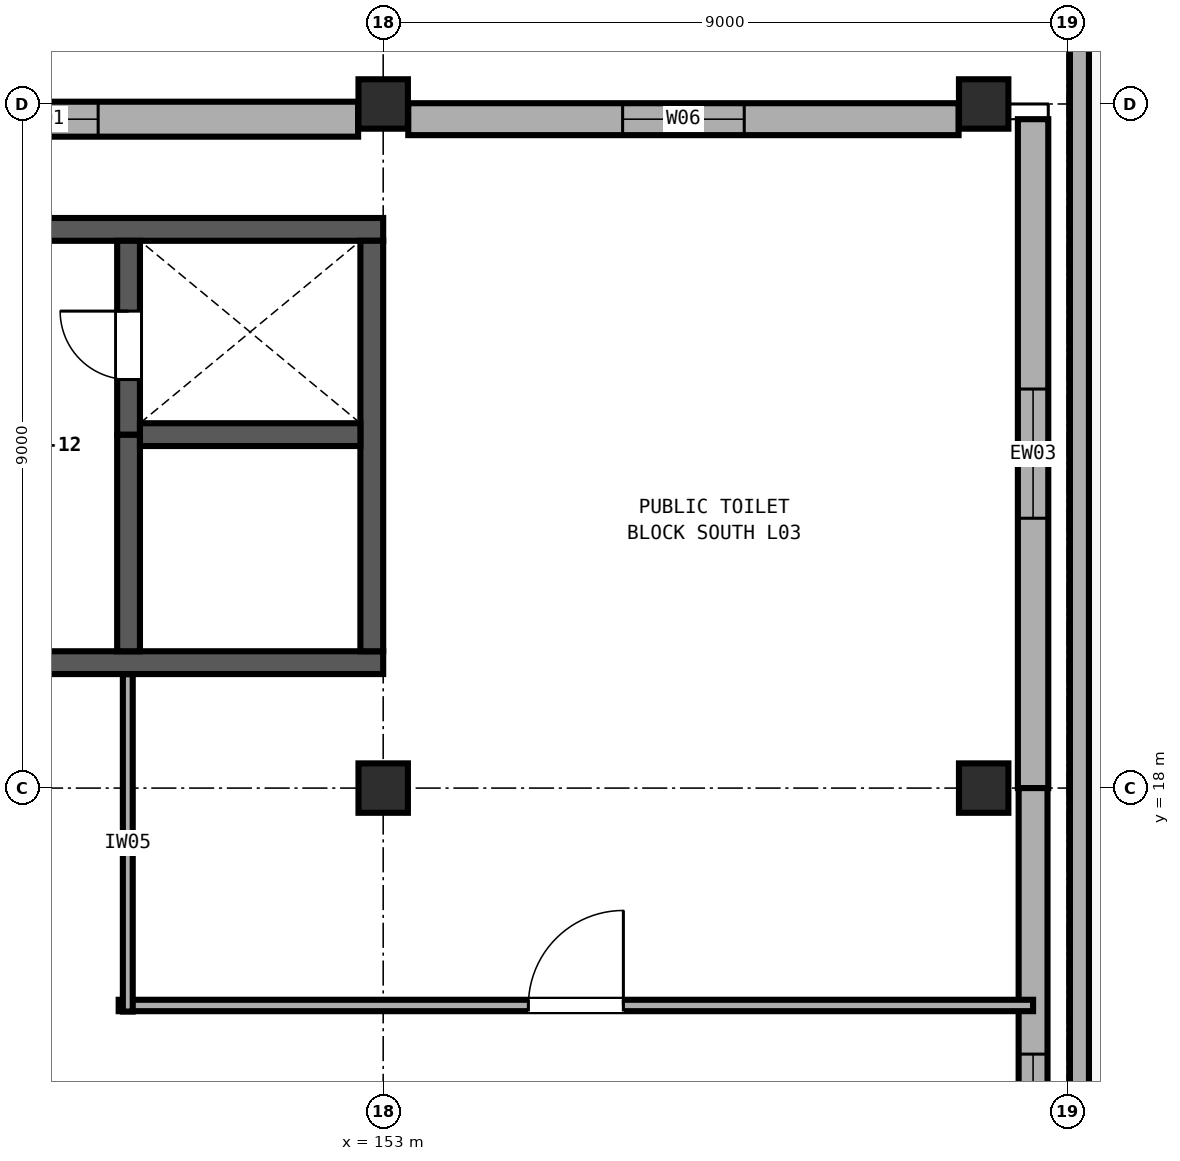
"""IFC4 building model, lengths in metres.
Left out: names, types, materials, properties, quantities, classifications, styles, units other than length and angle.
Written with IfcOpenShell. Run it as: python <this file> out.ifc"""

import sys

from ifc_helpers import new_model, si_unit, direction, frame, frame_2d, origin, origin_2d, place, context, subcontext, project, spatial, rectangle, extrude, element, fill, save


model = new_model("IFC4")
c1 = context("Model", 3, precision=1e-05, world=origin(), true_north=direction((0.0, 1.0)))
c2 = subcontext(c1, "Body", "Model", "MODEL_VIEW")
j1 = project(units=[si_unit("LENGTHUNIT", "METRE"), si_unit("PLANEANGLEUNIT", "RADIAN")], contexts=[c1])
p1 = place(None, origin())
s1 = spatial("IfcSite", under=j1, at=p1, CompositionType="ELEMENT")
p2 = place(p1, origin())
s2 = spatial("IfcBuilding", under=s1, at=p2, CompositionType="ELEMENT")
p3 = place(p2, frame((0.0, 0.0, 14.4)))
s3 = spatial("IfcBuildingStorey", under=s2, at=p3, CompositionType="ELEMENT", Elevation=14.4)
for number, where, z_axis, x_axis in (
    (1, (153.0, 18.0, 0.0), (0.0, 0.0, 1.0), (1.0, 0.0, 0.0)),
    (2, (153.0, 27.0, 0.0), (0.0, 0.0, 1.0), (1.0, 0.0, 0.0)),
    (3, (160.9, 18.0, 0.0), (0.0, 0.0, 1.0), (1.0, 0.0, 0.0)),
    (4, (160.9, 27.0, 0.0), (0.0, 0.0, 1.0), (1.0, 0.0, 0.0)),
):
    element("IfcColumn", number, at=place(p3, frame(where, z_axis=z_axis, x_axis=x_axis)), inside=s3, PredefinedType="COLUMN", context=c2, shape_type="SweptSolid", body=[
        extrude(rectangle(XDim=0.65, YDim=0.65, at=origin_2d()), origin(), (0.0, 0.0, 1.0), 4.8),
    ])
p4 = place(p3, frame((135.0, 19.65, 0.0), z_axis=(0.0, 0.0, 1.0), x_axis=(1.0, 0.0, 0.0)))
e5 = element("IfcWall", 5, at=p4, inside=s3, PredefinedType="SHEAR", context=c2, shape_type="SweptSolid", body=[
    extrude(rectangle(XDim=18.0, YDim=0.3, at=frame_2d((9.0, 0.0))), origin(), (0.0, 0.0, 1.0), 4.555),
])
p5 = place(p4, frame((11.4, 0.0, 0.0)))
e6 = element("IfcOpeningElement", 6, at=p5, cuts=e5, PredefinedType="OPENING", context=c2, shape_type="SweptSolid", body=[
    extrude(rectangle(XDim=1.9, YDim=2.25, at=frame_2d((0.95, 1.125))), frame((0.0, 0.16, 0.0), z_axis=(0.0, -1.0, 0.0), x_axis=(1.0, 0.0, 0.0)), (0.0, 0.0, 1.0), 0.32),
])
p6 = place(p3, frame((153.0, 25.35, 0.0), z_axis=(0.0, 0.0, 1.0), x_axis=(-1.0, 0.0, 0.0)))
e7 = element("IfcWall", 7, at=p6, inside=s3, PredefinedType="SHEAR", context=c2, shape_type="SweptSolid", body=[
    extrude(rectangle(XDim=18.0, YDim=0.3, at=frame_2d((9.0, 0.0))), origin(), (0.0, 0.0, 1.0), 4.555),
])
p7 = place(p3, frame((152.85, 19.8, 0.0), z_axis=(0.0, 0.0, 1.0), x_axis=(0.0, 1.0, 0.0)))
e8 = element("IfcWall", 8, at=p7, inside=s3, PredefinedType="SHEAR", context=c2, shape_type="SweptSolid", body=[
    extrude(rectangle(XDim=5.4, YDim=0.3, at=frame_2d((2.7, 0.0))), origin(), (0.0, 0.0, 1.0), 4.555),
])
p8 = place(p3, frame((149.65, 19.8, 0.0), z_axis=(0.0, 0.0, 1.0), x_axis=(0.0, 1.0, 0.0)))
e9 = element("IfcWall", 9, at=p8, inside=s3, PredefinedType="SHEAR", context=c2, shape_type="SweptSolid", body=[
    extrude(rectangle(XDim=2.85, YDim=0.3, at=frame_2d((1.425, 0.0))), origin(), (0.0, 0.0, 1.0), 4.555),
])
p9 = place(p3, frame((149.65, 22.65, 0.0), z_axis=(0.0, 0.0, 1.0), x_axis=(0.0, 1.0, 0.0)))
e10 = element("IfcWall", 10, at=p9, inside=s3, PredefinedType="SHEAR", context=c2, shape_type="SweptSolid", body=[
    extrude(rectangle(XDim=2.55, YDim=0.3, at=frame_2d((1.275, 0.0))), origin(), (0.0, 0.0, 1.0), 4.555),
])
p10 = place(p9, frame((0.725, 0.0, 0.0)))
e11 = element("IfcOpeningElement", 11, at=p10, cuts=e10, PredefinedType="OPENING", context=c2, shape_type="SweptSolid", body=[
    extrude(rectangle(XDim=0.9, YDim=2.1, at=frame_2d((0.45, 1.05))), frame((0.0, 0.16, 0.0), z_axis=(0.0, -1.0, 0.0), x_axis=(1.0, 0.0, 0.0)), (0.0, 0.0, 1.0), 0.32),
])
p11 = place(p3, frame((149.8, 22.65, 0.0), z_axis=(0.0, 0.0, 1.0), x_axis=(1.0, 0.0, 0.0)))
e12 = element("IfcWall", 12, at=p11, inside=s3, PredefinedType="SHEAR", context=c2, shape_type="SweptSolid", body=[
    extrude(rectangle(XDim=2.9, YDim=0.3, at=frame_2d((1.45, 0.0))), origin(), (0.0, 0.0, 1.0), 4.555),
])
p12 = place(p3, frame((144.33, 26.8, 0.0), z_axis=(0.0, 0.0, 1.0), x_axis=(1.0, 0.0, 0.0)))
e13 = element("IfcWall", 13, at=p12, inside=s3, PredefinedType="SOLIDWALL", context=c2, shape_type="SweptSolid", body=[
    extrude(rectangle(XDim=8.34, YDim=0.46, at=frame_2d((4.17, 0.0))), origin(), (0.0, 0.0, 1.0), 3.58),
])
p13 = place(p12, frame((3.42, 0.0, 0.9)))
e14 = element("IfcOpeningElement", 14, at=p13, cuts=e13, PredefinedType="OPENING", context=c2, shape_type="SweptSolid", body=[
    extrude(rectangle(XDim=1.5, YDim=1.6, at=frame_2d((0.75, 0.8))), frame((0.0, 0.24, 0.0), z_axis=(0.0, -1.0, 0.0), x_axis=(1.0, 0.0, 0.0)), (0.0, 0.0, 1.0), 0.48),
])
p14 = place(p3, frame((153.33, 26.8, 0.0), z_axis=(0.0, 0.0, 1.0), x_axis=(1.0, 0.0, 0.0)))
e15 = element("IfcWall", 15, at=p14, inside=s3, PredefinedType="SOLIDWALL", context=c2, shape_type="SweptSolid", body=[
    extrude(rectangle(XDim=7.24, YDim=0.42, at=frame_2d((3.62, 0.0))), origin(), (0.0, 0.0, 1.0), 3.58),
])
p15 = place(p14, frame((2.82, 0.0, 0.9)))
e16 = element("IfcOpeningElement", 16, at=p15, cuts=e15, PredefinedType="OPENING", context=c2, shape_type="SweptSolid", body=[
    extrude(rectangle(XDim=1.6, YDim=1.65, at=frame_2d((0.8, 0.825))), frame((0.0, 0.22, 0.0), z_axis=(0.0, -1.0, 0.0), x_axis=(1.0, 0.0, 0.0)), (0.0, 0.0, 1.0), 0.44),
])
p16 = place(p3, frame((161.55, 26.8, 0.0), z_axis=(0.0, 0.0, 1.0), x_axis=(0.0, -1.0, 0.0)))
e17 = element("IfcWall", 17, at=p16, inside=s3, PredefinedType="SOLIDWALL", context=c2, shape_type="SweptSolid", body=[
    extrude(rectangle(XDim=8.8, YDim=0.4, at=frame_2d((4.4, 0.0))), origin(), (0.0, 0.0, 1.0), 3.58),
])
p17 = place(p16, frame((3.55, 0.0, 0.9)))
e18 = element("IfcOpeningElement", 18, at=p17, cuts=e17, PredefinedType="OPENING", context=c2, shape_type="SweptSolid", body=[
    extrude(rectangle(XDim=1.7, YDim=1.7, at=frame_2d((0.85, 0.85))), frame((0.0, 0.21, 0.0), z_axis=(0.0, -1.0, 0.0), x_axis=(1.0, 0.0, 0.0)), (0.0, 0.0, 1.0), 0.42),
])
p18 = place(p3, frame((161.55, 18.0, 0.0), z_axis=(0.0, 0.0, 1.0), x_axis=(0.0, -1.0, 0.0)))
e19 = element("IfcWall", 19, at=p18, inside=s3, PredefinedType="SOLIDWALL", context=c2, shape_type="SweptSolid", body=[
    extrude(rectangle(XDim=8.8, YDim=0.38, at=frame_2d((4.4, 0.0))), origin(), (0.0, 0.0, 1.0), 3.58),
])
p19 = place(p18, frame((3.5, 0.0, 0.9)))
e20 = element("IfcOpeningElement", 20, at=p19, cuts=e19, PredefinedType="OPENING", context=c2, shape_type="SweptSolid", body=[
    extrude(rectangle(XDim=1.8, YDim=1.75, at=frame_2d((0.9, 0.875))), frame((0.0, 0.2, 0.0), z_axis=(0.0, -1.0, 0.0), x_axis=(1.0, 0.0, 0.0)), (0.0, 0.0, 1.0), 0.4),
])
p20 = place(p3, frame((162.16, 9.16, 0.0), z_axis=(0.0, 0.0, 1.0), x_axis=(0.0, 1.0, 0.0)))
e21 = element("IfcWall", 21, at=p20, inside=s3, PredefinedType="PARAPET", context=c2, shape_type="SweptSolid", body=[
    extrude(rectangle(XDim=26.68, YDim=0.25, at=frame_2d((13.34, 0.0))), origin(), (0.0, 0.0, 1.0), 0.65),
])
p21 = place(p3, frame((149.52, 15.14, 0.0), z_axis=(0.0, 0.0, 1.0), x_axis=(1.0, 0.0, 0.0)))
e22 = element("IfcWall", 22, at=p21, inside=s3, PredefinedType="PARTITIONING", context=c2, shape_type="SweptSolid", body=[
    extrude(rectangle(XDim=12.03, YDim=0.15, at=frame_2d((6.015, 0.0))), origin(), (0.0, 0.0, 1.0), 3.56),
])
p22 = place(p21, frame((5.39, 0.0, 0.0)))
e23 = element("IfcOpeningElement", 23, at=p22, cuts=e22, PredefinedType="OPENING", context=c2, shape_type="SweptSolid", body=[
    extrude(rectangle(XDim=1.25, YDim=2.15, at=frame_2d((0.625, 1.075))), frame((0.0, 0.085, 0.0), z_axis=(0.0, -1.0, 0.0), x_axis=(1.0, 0.0, 0.0)), (0.0, 0.0, 1.0), 0.17),
])
p23 = place(p3, frame((149.64, 15.06, 0.0), z_axis=(0.0, 0.0, 1.0), x_axis=(0.0, 1.0, 0.0)))
e24 = element("IfcWall", 24, at=p23, inside=s3, PredefinedType="PARTITIONING", context=c2, shape_type="SweptSolid", body=[
    extrude(rectangle(XDim=4.438, YDim=0.13, at=frame_2d((2.219, 0.0))), origin(), (0.0, 0.0, 1.0), 3.56),
])
p24 = place(p13, origin())
e25 = element("IfcWindow", 25, at=p24, inside=s3, PartitioningType="SINGLE_PANEL", PredefinedType="WINDOW", context=c2, shape_type="SweptSolid", body=[
    extrude(rectangle(XDim=1.5, YDim=1.6, at=frame_2d((0.75, 0.8))), frame((0.0, 0.03, 0.0), z_axis=(0.0, -1.0, 0.0), x_axis=(1.0, 0.0, 0.0)), (0.0, 0.0, 1.0), 0.06),
])
fill(e14, e25)
p25 = place(p15, origin())
e26 = element("IfcWindow", 26, at=p25, inside=s3, PartitioningType="SINGLE_PANEL", PredefinedType="WINDOW", context=c2, shape_type="SweptSolid", body=[
    extrude(rectangle(XDim=1.6, YDim=1.65, at=frame_2d((0.8, 0.825))), frame((0.0, 0.03, 0.0), z_axis=(0.0, -1.0, 0.0), x_axis=(1.0, 0.0, 0.0)), (0.0, 0.0, 1.0), 0.06),
])
fill(e16, e26)
p26 = place(p17, origin())
e27 = element("IfcWindow", 27, at=p26, inside=s3, PartitioningType="SINGLE_PANEL", PredefinedType="WINDOW", context=c2, shape_type="SweptSolid", body=[
    extrude(rectangle(XDim=1.7, YDim=1.7, at=frame_2d((0.85, 0.85))), frame((0.0, 0.03, 0.0), z_axis=(0.0, -1.0, 0.0), x_axis=(1.0, 0.0, 0.0)), (0.0, 0.0, 1.0), 0.06),
])
fill(e18, e27)
p27 = place(p19, origin())
e28 = element("IfcWindow", 28, at=p27, inside=s3, PartitioningType="DOUBLE_PANEL_VERTICAL", PredefinedType="WINDOW", context=c2, shape_type="SweptSolid", body=[
    extrude(rectangle(XDim=1.8, YDim=1.75, at=frame_2d((0.9, 0.875))), frame((0.0, 0.03, 0.0), z_axis=(0.0, -1.0, 0.0), x_axis=(1.0, 0.0, 0.0)), (0.0, 0.0, 1.0), 0.06),
])
fill(e20, e28)
p28 = place(p10, origin())
e29 = element("IfcDoor", 29, at=p28, inside=s3, OperationType="SINGLE_SWING_RIGHT", PredefinedType="DOOR", context=c2, shape_type="SweptSolid", body=[
    extrude(rectangle(XDim=0.9, YDim=2.1, at=frame_2d((0.45, 1.05))), frame((0.0, 0.025, 0.0), z_axis=(0.0, -1.0, 0.0), x_axis=(1.0, 0.0, 0.0)), (0.0, 0.0, 1.0), 0.05),
])
fill(e11, e29)
p29 = place(p22, origin())
e30 = element("IfcDoor", 30, at=p29, inside=s3, OperationType="SINGLE_SWING_RIGHT", PredefinedType="DOOR", context=c2, shape_type="SweptSolid", body=[
    extrude(rectangle(XDim=1.25, YDim=2.15, at=frame_2d((0.625, 1.075))), frame((0.0, 0.025, 0.0), z_axis=(0.0, -1.0, 0.0), x_axis=(1.0, 0.0, 0.0)), (0.0, 0.0, 1.0), 0.05),
])
fill(e23, e30)
save(model, sys.argv[1])
